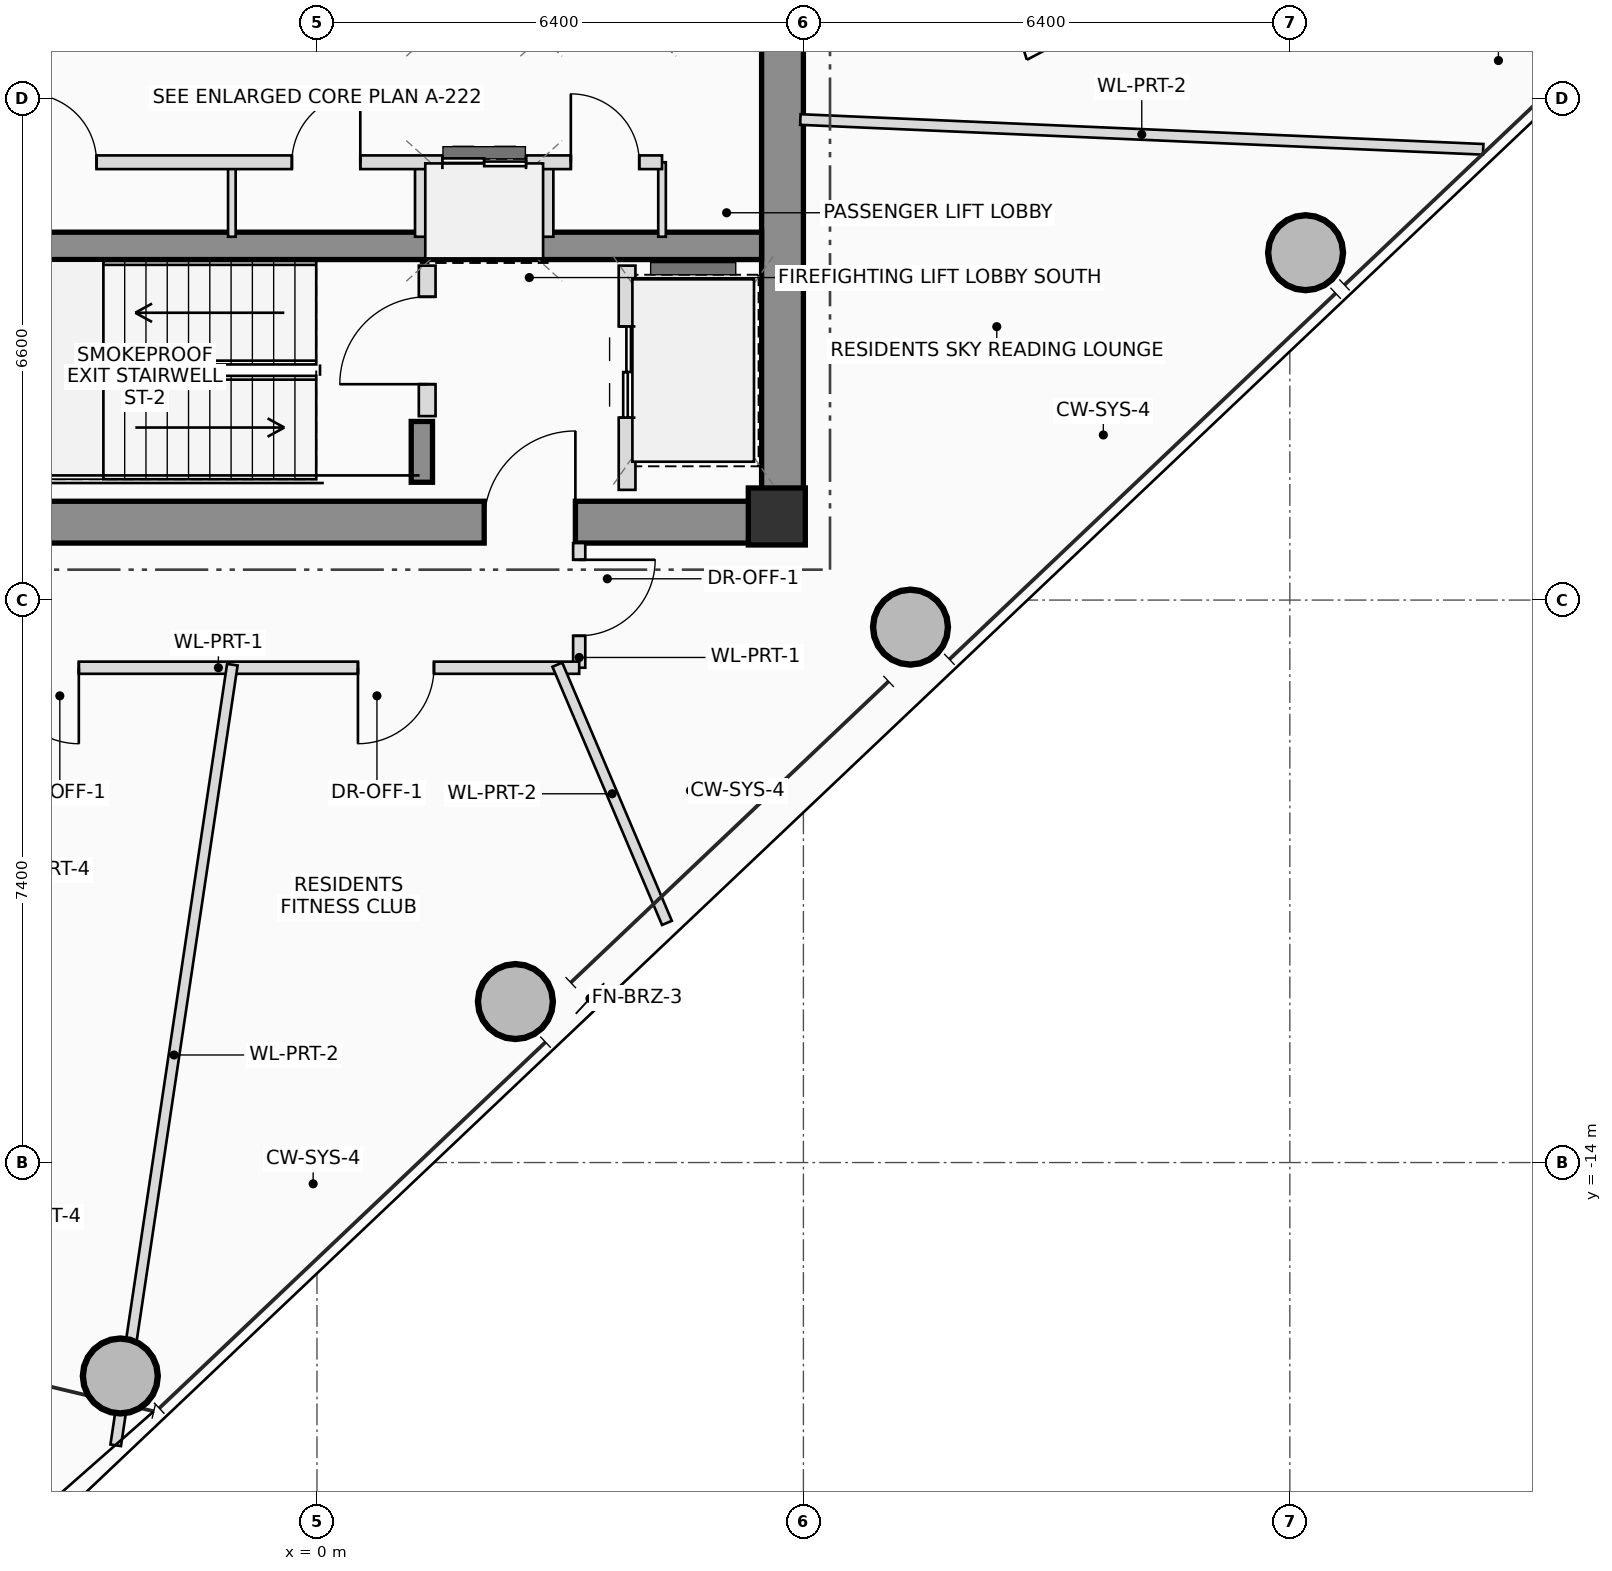
"""IFC4 building model, lengths in metres.
Left out: names, types, materials, properties, quantities, classifications, styles, units other than length and angle.
Written with IfcOpenShell. Run it as: python <this file> out.ifc"""

import sys

from ifc_helpers import new_model, si_unit, direction, frame, frame_2d, origin, origin_2d, place, context, subcontext, project, spatial, rectangle, hollow_circle, extrude, source, transform, mapped, element, fill, save


model = new_model("IFC4")
c1 = context("Model", 3, precision=1e-05, world=origin(), true_north=direction((0.0, 1.0)))
c2 = subcontext(c1, "Body", "Model", "MODEL_VIEW")
j1 = project(units=[si_unit("LENGTHUNIT", "METRE"), si_unit("PLANEANGLEUNIT", "RADIAN")], contexts=[c1])
p1 = place(None, origin())
s1 = spatial("IfcSite", under=j1, at=p1, CompositionType="ELEMENT")
p2 = place(p1, origin())
s2 = spatial("IfcBuilding", under=s1, at=p2, CompositionType="ELEMENT")
p3 = place(p2, frame((0.0, 0.0, 235.45)))
s3 = spatial("IfcBuildingStorey", under=s2, at=p3, CompositionType="ELEMENT", Elevation=235.45)
m1 = source(origin(), c2, "Body", "SweptSolid", [
    extrude(rectangle(XDim=0.75, YDim=0.75, at=origin_2d()), origin(), (0.0, 0.0, 1.0), 3.4),
])
p4 = place(p3, frame((6.05, -5.5, 0.0), z_axis=(0.0, 0.0, 1.0), x_axis=(1.0, 0.0, 0.0)))
e1 = element("IfcColumn", 1, at=p4, inside=s3, PredefinedType="COLUMN", context=c2, shape_type="MappedRepresentation", body=[
    mapped(m1, transform((0.0, 0.0, 0.0), scale=1.0)),
])
p5 = place(p3, frame((-6.4, -5.575, 0.0), z_axis=(0.0, 0.0, 1.0), x_axis=(1.0, 0.0, 0.0)))
e2 = element("IfcWall", 2, at=p5, inside=s3, PredefinedType="SHEAR", context=c2, shape_type="SweptSolid", body=[
    extrude(rectangle(XDim=12.8, YDim=0.55, at=frame_2d((6.4, 0.0))), origin(), (0.0, 0.0, 1.0), 3.4),
])
p6 = place(p5, frame((8.6, 0.0, 0.0)))
e3 = element("IfcOpeningElement", 3, at=p6, cuts=e2, PredefinedType="OPENING", context=c2, shape_type="SweptSolid", body=[
    extrude(rectangle(XDim=1.2, YDim=2.2, at=frame_2d((0.6, 1.1))), frame((0.0, 0.285, 0.0), z_axis=(0.0, -1.0, 0.0), x_axis=(1.0, 0.0, 0.0)), (0.0, 0.0, 1.0), 0.57),
])
p7 = place(p3, frame((6.125, -5.3, 0.0), z_axis=(0.0, 0.0, 1.0), x_axis=(0.0, 1.0, 0.0)))
e4 = element("IfcWall", 4, at=p7, inside=s3, PredefinedType="SHEAR", context=c2, shape_type="SweptSolid", body=[
    extrude(rectangle(XDim=10.6, YDim=0.55, at=frame_2d((5.3, 0.0))), origin(), (0.0, 0.0, 1.0), 3.4),
])
p8 = place(p3, frame((-5.85, -1.94, 0.0), z_axis=(0.0, 0.0, 1.0), x_axis=(1.0, 0.0, 0.0)))
e5 = element("IfcWall", 5, at=p8, inside=s3, PredefinedType="SHEAR", context=c2, shape_type="SweptSolid", body=[
    extrude(rectangle(XDim=11.7, YDim=0.36, at=frame_2d((5.85, 0.0))), origin(), (0.0, 0.0, 1.0), 3.4),
])
p9 = place(p3, frame((1.38, -5.05, 0.0), z_axis=(0.0, 0.0, 1.0), x_axis=(0.0, 1.0, 0.0)))
e6 = element("IfcWall", 6, at=p9, inside=s3, PredefinedType="SHEAR", context=c2, shape_type="SweptSolid", body=[
    extrude(rectangle(XDim=0.8, YDim=0.28, at=frame_2d((0.4, 0.0))), origin(), (0.0, 0.0, 1.0), 3.4),
])
m2 = source(origin(), c2, "Body", "SweptSolid", [
    extrude(hollow_circle(Radius=0.5, WallThickness=0.04, at=origin_2d()), origin(), (0.0, 0.0, 1.0), 3.4),
])
for number, where, z_axis, x_axis in (
    (7, (-2.587, -16.808, 0.0), (0.0, 0.0, 1.0), (1.0, 0.0, 0.0)),
    (8, (2.611, -11.882, 0.0), (0.0, 0.0, 1.0), (1.0, 0.0, 0.0)),
    (9, (7.809, -6.956, 0.0), (0.0, 0.0, 1.0), (1.0, 0.0, 0.0)),
    (10, (13.007, -2.03, 0.0), (0.0, 0.0, 1.0), (1.0, 0.0, 0.0)),
):
    element("IfcColumn", number, at=place(p3, frame(where, z_axis=z_axis, x_axis=x_axis)), inside=s3, PredefinedType="COLUMN", context=c2, shape_type="MappedRepresentation", body=[
        mapped(m2, transform((0.0, 0.0, 0.0), scale=1.0)),
    ])
p10 = place(p3, frame((1.45, -4.18, 0.0), z_axis=(0.0, 0.0, 1.0), x_axis=(0.0, 1.0, 0.0)))
e11 = element("IfcWall", 11, at=p10, inside=s3, PredefinedType="PLUMBINGWALL", context=c2, shape_type="SweptSolid", body=[
    extrude(rectangle(XDim=1.98, YDim=0.22, at=frame_2d((0.99, 0.0))), origin(), (0.0, 0.0, 1.0), 3.2),
])
p11 = place(p10, frame((0.42, 0.0, 0.0)))
e12 = element("IfcOpeningElement", 12, at=p11, cuts=e11, PredefinedType="OPENING", context=c2, shape_type="SweptSolid", body=[
    extrude(rectangle(XDim=1.15, YDim=2.15, at=frame_2d((0.575, 1.075))), frame((0.0, 0.12, 0.0), z_axis=(0.0, -1.0, 0.0), x_axis=(1.0, 0.0, 0.0)), (0.0, 0.0, 1.0), 0.24),
])
p12 = place(p3, frame((4.08, -5.15, 0.0), z_axis=(0.0, 0.0, 1.0), x_axis=(0.0, 1.0, 0.0)))
e13 = element("IfcWall", 13, at=p12, inside=s3, PredefinedType="PLUMBINGWALL", context=c2, shape_type="SweptSolid", body=[
    extrude(rectangle(XDim=2.95, YDim=0.22, at=frame_2d((1.475, 0.0))), origin(), (0.0, 0.0, 1.0), 3.2),
])
p13 = place(p12, frame((0.95, 0.0, 0.0)))
e14 = element("IfcOpeningElement", 14, at=p13, cuts=e13, PredefinedType="OPENING", context=c2, shape_type="SweptSolid", body=[
    extrude(rectangle(XDim=1.2, YDim=2.25, at=frame_2d((0.6, 1.125))), frame((0.0, 0.12, 0.0), z_axis=(0.0, -1.0, 0.0), x_axis=(1.0, 0.0, 0.0)), (0.0, 0.0, 1.0), 0.24),
])
p14 = place(p3, frame((-1.12, -1.82, 0.0), z_axis=(0.0, 0.0, 1.0), x_axis=(0.0, 1.0, 0.0)))
e15 = element("IfcWall", 15, at=p14, inside=s3, PredefinedType="PARTITIONING", context=c2, shape_type="SweptSolid", body=[
    extrude(rectangle(XDim=0.98, YDim=0.1, at=frame_2d((0.49, 0.0))), origin(), (0.0, 0.0, 1.0), 3.2),
])
for number, where, z_axis, x_axis in (
    (16, (1.38, -1.82, 0.0), (0.0, 0.0, 1.0), (0.0, 1.0, 0.0)),
    (17, (3.02, -1.82, 0.0), (0.0, 0.0, 1.0), (0.0, 1.0, 0.0)),
):
    element("IfcWall", number, at=place(p3, frame(where, z_axis=z_axis, x_axis=x_axis)), inside=s3, PredefinedType="PLUMBINGWALL", context=c2, shape_type="SweptSolid", body=[
        extrude(rectangle(XDim=0.98, YDim=0.18, at=frame_2d((0.49, 0.0))), origin(), (0.0, 0.0, 1.0), 3.2),
    ])
p15 = place(p3, frame((4.54, -1.82, 0.0), z_axis=(0.0, 0.0, 1.0), x_axis=(0.0, 1.0, 0.0)))
e18 = element("IfcWall", 18, at=p15, inside=s3, PredefinedType="PARTITIONING", context=c2, shape_type="SweptSolid", body=[
    extrude(rectangle(XDim=0.98, YDim=0.1, at=frame_2d((0.49, 0.0))), origin(), (0.0, 0.0, 1.0), 3.2),
])
p16 = place(p3, frame((-5.68, -0.84, 0.0), z_axis=(0.0, 0.0, 1.0), x_axis=(1.0, 0.0, 0.0)))
e19 = element("IfcWall", 19, at=p16, inside=s3, PredefinedType="PLUMBINGWALL", context=c2, shape_type="SweptSolid", body=[
    extrude(rectangle(XDim=10.22, YDim=0.18, at=frame_2d((5.11, 0.0))), origin(), (0.0, 0.0, 1.0), 3.2),
])
p17 = place(p16, frame((1.88, 0.0, 0.0)))
e20 = element("IfcOpeningElement", 20, at=p17, cuts=e19, PredefinedType="OPENING", context=c2, shape_type="SweptSolid", body=[
    extrude(rectangle(XDim=0.9, YDim=2.05, at=frame_2d((0.45, 1.025))), frame((0.0, 0.1, 0.0), z_axis=(0.0, -1.0, 0.0), x_axis=(1.0, 0.0, 0.0)), (0.0, 0.0, 1.0), 0.2),
])
p18 = place(p16, frame((5.35, 0.0, 0.0)))
e21 = element("IfcOpeningElement", 21, at=p18, cuts=e19, PredefinedType="OPENING", context=c2, shape_type="SweptSolid", body=[
    extrude(rectangle(XDim=0.9, YDim=2.05, at=frame_2d((0.45, 1.025))), frame((0.0, 0.1, 0.0), z_axis=(0.0, -1.0, 0.0), x_axis=(1.0, 0.0, 0.0)), (0.0, 0.0, 1.0), 0.2),
])
p19 = place(p16, frame((7.33, 0.0, 0.0)))
e22 = element("IfcOpeningElement", 22, at=p19, cuts=e19, PredefinedType="OPENING", context=c2, shape_type="SweptSolid", body=[
    extrude(rectangle(XDim=1.1, YDim=2.2, at=frame_2d((0.55, 1.1))), frame((0.0, 0.1, 0.0), z_axis=(0.0, -1.0, 0.0), x_axis=(1.0, 0.0, 0.0)), (0.0, 0.0, 1.0), 0.2),
])
p20 = place(p16, frame((9.02, 0.0, 0.0)))
e23 = element("IfcOpeningElement", 23, at=p20, cuts=e19, PredefinedType="OPENING", context=c2, shape_type="SweptSolid", body=[
    extrude(rectangle(XDim=0.9, YDim=2.05, at=frame_2d((0.45, 1.025))), frame((0.0, 0.1, 0.0), z_axis=(0.0, -1.0, 0.0), x_axis=(1.0, 0.0, 0.0)), (0.0, 0.0, 1.0), 0.2),
])
p21 = place(p3, frame((3.45, -5.85, 0.0), z_axis=(0.0, 0.0, 1.0), x_axis=(0.0, -1.0, 0.0)))
e24 = element("IfcWall", 24, at=p21, inside=s3, PredefinedType="PARTITIONING", context=c2, shape_type="SweptSolid", body=[
    extrude(rectangle(XDim=1.64, YDim=0.16, at=frame_2d((0.82, 0.0))), origin(), (0.0, 0.0, 1.0), 3.2),
])
p22 = place(p21, frame((0.22, 0.0, 0.0)))
e25 = element("IfcOpeningElement", 25, at=p22, cuts=e24, PredefinedType="OPENING", context=c2, shape_type="SweptSolid", body=[
    extrude(rectangle(XDim=1.0, YDim=2.25, at=frame_2d((0.5, 1.125))), frame((0.0, 0.09, 0.0), z_axis=(0.0, -1.0, 0.0), x_axis=(1.0, 0.0, 0.0)), (0.0, 0.0, 1.0), 0.18),
])
p23 = place(p3, frame((3.45, -7.49, 0.0), z_axis=(0.0, 0.0, 1.0), x_axis=(-1.0, 0.0, 0.0)))
e26 = element("IfcWall", 26, at=p23, inside=s3, PredefinedType="PARTITIONING", context=c2, shape_type="SweptSolid", body=[
    extrude(rectangle(XDim=9.81, YDim=0.16, at=frame_2d((4.905, 0.0))), origin(), (0.0, 0.0, 1.0), 2.605),
])
p24 = place(p23, frame((1.911, 0.0, 0.0)))
e27 = element("IfcOpeningElement", 27, at=p24, cuts=e26, PredefinedType="OPENING", context=c2, shape_type="SweptSolid", body=[
    extrude(rectangle(XDim=1.0, YDim=2.25, at=frame_2d((0.5, 1.125))), frame((0.0, 0.09, 0.0), z_axis=(0.0, -1.0, 0.0), x_axis=(1.0, 0.0, 0.0)), (0.0, 0.0, 1.0), 0.18),
])
p25 = place(p23, frame((6.583, 0.0, 0.0)))
e28 = element("IfcOpeningElement", 28, at=p25, cuts=e26, PredefinedType="OPENING", context=c2, shape_type="SweptSolid", body=[
    extrude(rectangle(XDim=1.0, YDim=2.25, at=frame_2d((0.5, 1.125))), frame((0.0, 0.09, 0.0), z_axis=(0.0, -1.0, 0.0), x_axis=(1.0, 0.0, 0.0)), (0.0, 0.0, 1.0), 0.18),
])
p26 = place(p3, frame((6.36, -0.278, 0.0), z_axis=(0.0, 0.0, 1.0), x_axis=(0.99904773846, -0.043630451279, 0.0)))
e29 = element("IfcWall", 29, at=p26, inside=s3, PredefinedType="PARTITIONING", context=c2, shape_type="SweptSolid", body=[
    extrude(rectangle(XDim=8.992, YDim=0.14, at=frame_2d((4.496, 0.0))), origin(), (0.0, 0.0, 1.0), 2.605),
])
p27 = place(p3, frame((-1.113, -7.45, 0.0), z_axis=(0.0, 0.0, 1.0), x_axis=(-0.147817313856, -0.989014682259, 0.0)))
e30 = element("IfcWall", 30, at=p27, inside=s3, PredefinedType="PARTITIONING", context=c2, shape_type="SweptSolid", body=[
    extrude(rectangle(XDim=10.384, YDim=0.14, at=frame_2d((5.192, 0.0))), origin(), (0.0, 0.0, 1.0), 2.805),
])
p28 = place(p3, frame((3.162, -7.45, 0.0), z_axis=(0.0, 0.0, 1.0), x_axis=(0.39072313519, -0.920508246366, 0.0)))
e31 = element("IfcWall", 31, at=p28, inside=s3, PredefinedType="PARTITIONING", context=c2, shape_type="SweptSolid", body=[
    extrude(rectangle(XDim=3.69, YDim=0.14, at=frame_2d((1.845, 0.0))), origin(), (0.0, 0.0, 1.0), 2.605),
])
p29 = place(p6, origin())
e32 = element("IfcDoor", 32, at=p29, inside=s3, OperationType="SINGLE_SWING_RIGHT", PredefinedType="DOOR", context=c2, shape_type="SweptSolid", body=[
    extrude(rectangle(XDim=1.2, YDim=2.2, at=frame_2d((0.6, 1.1))), frame((0.0, 0.025, 0.0), z_axis=(0.0, -1.0, 0.0), x_axis=(1.0, 0.0, 0.0)), (0.0, 0.0, 1.0), 0.05),
])
fill(e3, e32)
p30 = place(p11, origin())
e33 = element("IfcDoor", 33, at=p30, inside=s3, OperationType="SINGLE_SWING_LEFT", PredefinedType="DOOR", context=c2, shape_type="SweptSolid", body=[
    extrude(rectangle(XDim=1.15, YDim=2.15, at=frame_2d((0.575, 1.075))), frame((0.0, 0.025, 0.0), z_axis=(0.0, -1.0, 0.0), x_axis=(1.0, 0.0, 0.0)), (0.0, 0.0, 1.0), 0.05),
])
fill(e12, e33)
p31 = place(p13, origin())
e34 = element("IfcDoor", 34, at=p31, inside=s3, OperationType="DOUBLE_DOOR_SLIDING", PredefinedType="DOOR", context=c2, shape_type="SweptSolid", body=[
    extrude(rectangle(XDim=1.2, YDim=2.25, at=frame_2d((0.6, 1.125))), frame((0.0, 0.025, 0.0), z_axis=(0.0, -1.0, 0.0), x_axis=(1.0, 0.0, 0.0)), (0.0, 0.0, 1.0), 0.05),
])
fill(e14, e34)
p32 = place(p17, origin())
e35 = element("IfcDoor", 35, at=p32, inside=s3, OperationType="SINGLE_SWING_LEFT", PredefinedType="DOOR", context=c2, shape_type="SweptSolid", body=[
    extrude(rectangle(XDim=0.9, YDim=2.05, at=frame_2d((0.45, 1.025))), frame((0.0, 0.025, 0.0), z_axis=(0.0, -1.0, 0.0), x_axis=(1.0, 0.0, 0.0)), (0.0, 0.0, 1.0), 0.05),
])
fill(e20, e35)
p33 = place(p18, origin())
e36 = element("IfcDoor", 36, at=p33, inside=s3, OperationType="SINGLE_SWING_RIGHT", PredefinedType="DOOR", context=c2, shape_type="SweptSolid", body=[
    extrude(rectangle(XDim=0.9, YDim=2.05, at=frame_2d((0.45, 1.025))), frame((0.0, 0.025, 0.0), z_axis=(0.0, -1.0, 0.0), x_axis=(1.0, 0.0, 0.0)), (0.0, 0.0, 1.0), 0.05),
])
fill(e21, e36)
p34 = place(p19, origin())
e37 = element("IfcDoor", 37, at=p34, inside=s3, OperationType="DOUBLE_DOOR_SLIDING", PredefinedType="DOOR", context=c2, shape_type="SweptSolid", body=[
    extrude(rectangle(XDim=1.1, YDim=2.2, at=frame_2d((0.55, 1.1))), frame((0.0, 0.025, 0.0), z_axis=(0.0, -1.0, 0.0), x_axis=(1.0, 0.0, 0.0)), (0.0, 0.0, 1.0), 0.05),
])
fill(e22, e37)
p35 = place(p20, origin())
e38 = element("IfcDoor", 38, at=p35, inside=s3, OperationType="SINGLE_SWING_LEFT", PredefinedType="DOOR", context=c2, shape_type="SweptSolid", body=[
    extrude(rectangle(XDim=0.9, YDim=2.05, at=frame_2d((0.45, 1.025))), frame((0.0, 0.025, 0.0), z_axis=(0.0, -1.0, 0.0), x_axis=(1.0, 0.0, 0.0)), (0.0, 0.0, 1.0), 0.05),
])
fill(e23, e38)
p36 = place(p22, origin())
e39 = element("IfcDoor", 39, at=p36, inside=s3, OperationType="SINGLE_SWING_LEFT", PredefinedType="DOOR", context=c2, shape_type="SweptSolid", body=[
    extrude(rectangle(XDim=1.0, YDim=2.25, at=frame_2d((0.5, 1.125))), frame((0.0, 0.025, 0.0), z_axis=(0.0, -1.0, 0.0), x_axis=(1.0, 0.0, 0.0)), (0.0, 0.0, 1.0), 0.05),
])
fill(e25, e39)
p37 = place(p24, origin())
e40 = element("IfcDoor", 40, at=p37, inside=s3, OperationType="SINGLE_SWING_RIGHT", PredefinedType="DOOR", context=c2, shape_type="SweptSolid", body=[
    extrude(rectangle(XDim=1.0, YDim=2.25, at=frame_2d((0.5, 1.125))), frame((0.0, 0.025, 0.0), z_axis=(0.0, -1.0, 0.0), x_axis=(1.0, 0.0, 0.0)), (0.0, 0.0, 1.0), 0.05),
])
fill(e27, e40)
p38 = place(p25, origin())
e41 = element("IfcDoor", 41, at=p38, inside=s3, OperationType="SINGLE_SWING_LEFT", PredefinedType="DOOR", context=c2, shape_type="SweptSolid", body=[
    extrude(rectangle(XDim=1.0, YDim=2.25, at=frame_2d((0.5, 1.125))), frame((0.0, 0.025, 0.0), z_axis=(0.0, -1.0, 0.0), x_axis=(1.0, 0.0, 0.0)), (0.0, 0.0, 1.0), 0.05),
])
fill(e28, e41)
save(model, sys.argv[1])
